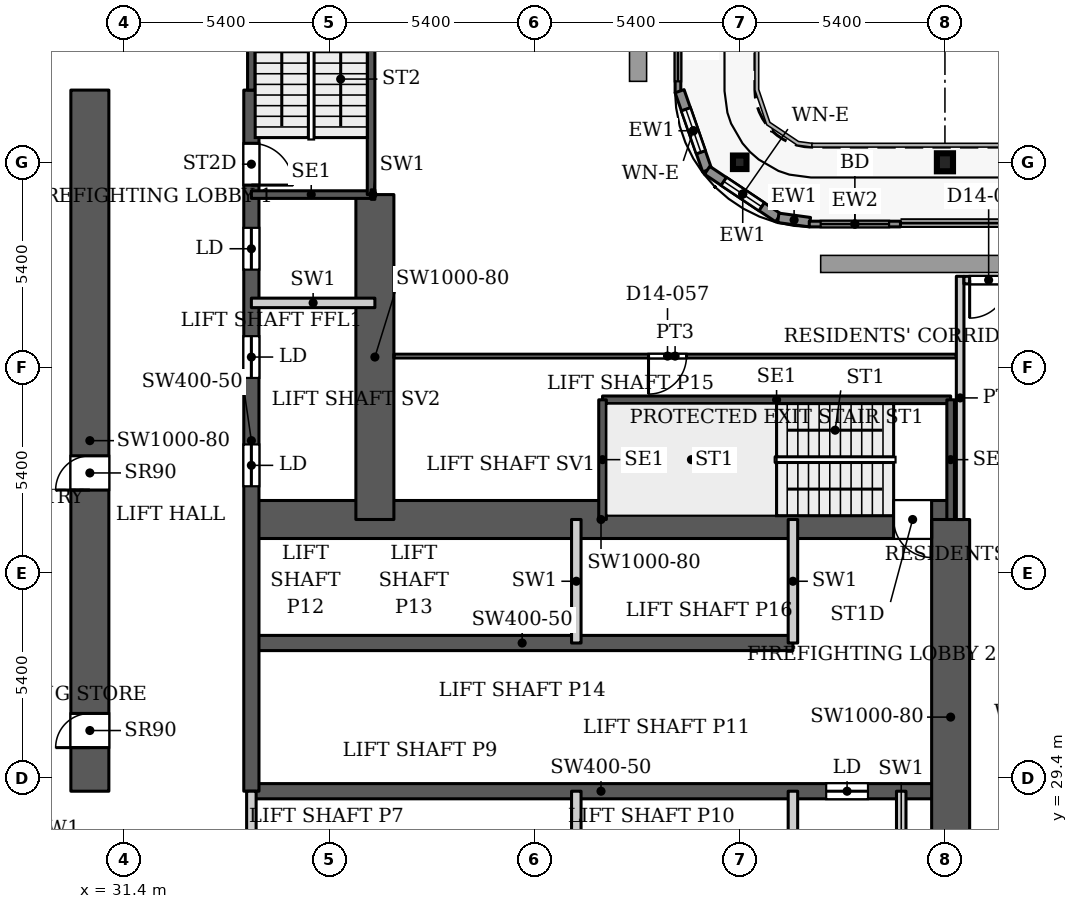
"""IFC4 building model, lengths in metres.
Left out: names, types, materials, properties, quantities, classifications, styles, units other than length and angle.
Written with IfcOpenShell. Run it as: python <this file> out.ifc"""

import sys

from ifc_helpers import new_model, si_unit, direction, frame, frame_2d, origin, origin_2d, place, context, subcontext, project, spatial, rectangle, hollow_rectangle, i_section, extrude, source, transform, mapped, element, fill, save


model = new_model("IFC4")
c1 = context("Model", 3, precision=1e-05, world=origin(), true_north=direction((0.0, 1.0)))
c2 = subcontext(c1, "Body", "Model", "MODEL_VIEW")
j1 = project(units=[si_unit("LENGTHUNIT", "METRE"), si_unit("PLANEANGLEUNIT", "RADIAN")], contexts=[c1])
p1 = place(None, origin())
s1 = spatial("IfcSite", under=j1, at=p1, CompositionType="ELEMENT")
p2 = place(p1, origin())
s2 = spatial("IfcBuilding", under=s1, at=p2, CompositionType="ELEMENT")
p3 = place(p2, frame((0.0, 0.0, 69.5)))
s3 = spatial("IfcBuildingStorey", under=s2, at=p3, CompositionType="ELEMENT", Elevation=69.5)
p4 = place(p3, frame((53.0, 45.6, 0.0), z_axis=(0.0, 0.0, 1.0), x_axis=(1.0, 0.0, 0.0)))
e1 = element("IfcColumn", 1, at=p4, inside=s3, PredefinedType="COLUMN", context=c2, shape_type="SweptSolid", body=[
    extrude(i_section(OverallWidth=0.424, OverallDepth=0.474, WebThickness=0.048, FlangeThickness=0.077, FilletRadius=0.014, at=origin_2d()), origin(), (0.0, 0.0, 1.0), 3.9),
])
p5 = place(p3, frame((47.6, 45.6, 0.0), z_axis=(0.0, 0.0, 1.0), x_axis=(1.0, 0.0, 0.0)))
e2 = element("IfcColumn", 2, at=p5, inside=s3, PredefinedType="COLUMN", context=c2, shape_type="SweptSolid", body=[
    extrude(hollow_rectangle(XDim=0.356, YDim=0.356, WallThickness=0.016, InnerFilletRadius=0.016, OuterFilletRadius=0.032, at=origin_2d()), origin(), (0.0, 0.0, 1.0), 3.9),
])
p6 = place(p3, frame((34.75, 29.05, 0.0), z_axis=(0.0, 0.0, 1.0), x_axis=(1.0, 0.0, 0.0)))
e3 = element("IfcWall", 3, at=p6, inside=s3, PredefinedType="SHEAR", context=c2, shape_type="SweptSolid", body=[
    extrude(rectangle(XDim=18.4, YDim=0.4, at=frame_2d((9.2, 0.0))), origin(), (0.0, 0.0, 1.0), 3.9),
])
p7 = place(p6, frame((15.125, 0.0, 0.0)))
e4 = element("IfcOpeningElement", 4, at=p7, cuts=e3, PredefinedType="OPENING", context=c2, shape_type="SweptSolid", body=[
    extrude(rectangle(XDim=1.1, YDim=2.2, at=frame_2d((0.55, 1.1))), frame((0.0, 0.21, 0.0), z_axis=(0.0, -1.0, 0.0), x_axis=(1.0, 0.0, 0.0)), (0.0, 0.0, 1.0), 0.42),
])
p8 = place(p3, frame((34.75, 32.95, 0.0), z_axis=(0.0, 0.0, 1.0), x_axis=(1.0, 0.0, 0.0)))
e5 = element("IfcWall", 5, at=p8, inside=s3, PredefinedType="SHEAR", context=c2, shape_type="SweptSolid", body=[
    extrude(rectangle(XDim=14.25, YDim=0.4, at=frame_2d((7.125, 0.0))), origin(), (0.0, 0.0, 1.0), 3.9),
])
p9 = place(p3, frame((34.75, 36.2, 0.0), z_axis=(0.0, 0.0, 1.0), x_axis=(1.0, 0.0, 0.0)))
e6 = element("IfcWall", 6, at=p9, inside=s3, PredefinedType="SHEAR", context=c2, shape_type="SweptSolid", body=[
    extrude(rectangle(XDim=18.4, YDim=1.0, at=frame_2d((9.2, 0.0))), origin(), (0.0, 0.0, 1.0), 3.9),
])
p10 = place(p9, frame((16.9, 0.0, 0.0)))
e7 = element("IfcOpeningElement", 7, at=p10, cuts=e6, PredefinedType="OPENING", context=c2, shape_type="SweptSolid", body=[
    extrude(rectangle(XDim=1.0, YDim=2.2, at=frame_2d((0.5, 1.1))), frame((0.0, 0.51, 0.0), z_axis=(0.0, -1.0, 0.0), x_axis=(1.0, 0.0, 0.0)), (0.0, 0.0, 1.0), 1.02),
])
p11 = place(p3, frame((34.75, 29.05, 0.0), z_axis=(0.0, 0.0, 1.0), x_axis=(0.0, 1.0, 0.0)))
e8 = element("IfcWall", 8, at=p11, inside=s3, PredefinedType="SHEAR", context=c2, shape_type="SweptSolid", body=[
    extrude(rectangle(XDim=18.45, YDim=0.4, at=frame_2d((9.225, 0.0))), origin(), (0.0, 0.0, 1.0), 3.9),
])
p12 = place(p11, frame((8.025, 0.0, 0.0)))
e9 = element("IfcOpeningElement", 9, at=p12, cuts=e8, PredefinedType="OPENING", context=c2, shape_type="SweptSolid", body=[
    extrude(rectangle(XDim=1.1, YDim=2.2, at=frame_2d((0.55, 1.1))), frame((0.0, 0.21, 0.0), z_axis=(0.0, -1.0, 0.0), x_axis=(1.0, 0.0, 0.0)), (0.0, 0.0, 1.0), 0.42),
])
p13 = place(p11, frame((10.875, 0.0, 0.0)))
e10 = element("IfcOpeningElement", 10, at=p13, cuts=e8, PredefinedType="OPENING", context=c2, shape_type="SweptSolid", body=[
    extrude(rectangle(XDim=1.1, YDim=2.2, at=frame_2d((0.55, 1.1))), frame((0.0, 0.21, 0.0), z_axis=(0.0, -1.0, 0.0), x_axis=(1.0, 0.0, 0.0)), (0.0, 0.0, 1.0), 0.42),
])
p14 = place(p11, frame((13.725, 0.0, 0.0)))
e11 = element("IfcOpeningElement", 11, at=p14, cuts=e8, PredefinedType="OPENING", context=c2, shape_type="SweptSolid", body=[
    extrude(rectangle(XDim=1.1, YDim=2.2, at=frame_2d((0.55, 1.1))), frame((0.0, 0.21, 0.0), z_axis=(0.0, -1.0, 0.0), x_axis=(1.0, 0.0, 0.0)), (0.0, 0.0, 1.0), 0.42),
])
p15 = place(p11, frame((15.95, 0.0, 0.0)))
e12 = element("IfcOpeningElement", 12, at=p15, cuts=e8, PredefinedType="OPENING", context=c2, shape_type="SweptSolid", body=[
    extrude(rectangle(XDim=1.1, YDim=2.2, at=frame_2d((0.55, 1.1))), frame((0.0, 0.21, 0.0), z_axis=(0.0, -1.0, 0.0), x_axis=(1.0, 0.0, 0.0)), (0.0, 0.0, 1.0), 0.42),
])
p16 = place(p3, frame((38.0, 36.2, 0.0), z_axis=(0.0, 0.0, 1.0), x_axis=(0.0, 1.0, 0.0)))
e13 = element("IfcWall", 13, at=p16, inside=s3, PredefinedType="SHEAR", context=c2, shape_type="SweptSolid", body=[
    extrude(rectangle(XDim=8.55, YDim=1.0, at=frame_2d((4.275, 0.0))), origin(), (0.0, 0.0, 1.0), 3.9),
])
p17 = place(p3, frame((30.5, 29.05, 0.0), z_axis=(0.0, 0.0, 1.0), x_axis=(0.0, 1.0, 0.0)))
e14 = element("IfcWall", 14, at=p17, inside=s3, PredefinedType="SHEAR", context=c2, shape_type="SweptSolid", body=[
    extrude(rectangle(XDim=18.45, YDim=1.0, at=frame_2d((9.225, 0.0))), origin(), (0.0, 0.0, 1.0), 3.9),
])
p18 = place(p17, frame((1.147, 0.0, 0.0)))
e15 = element("IfcOpeningElement", 15, at=p18, cuts=e14, PredefinedType="OPENING", context=c2, shape_type="SweptSolid", body=[
    extrude(rectangle(XDim=0.9, YDim=2.2, at=frame_2d((0.45, 1.1))), frame((0.0, 0.51, 0.0), z_axis=(0.0, -1.0, 0.0), x_axis=(1.0, 0.0, 0.0)), (0.0, 0.0, 1.0), 1.02),
])
p19 = place(p17, frame((7.925, 0.0, 0.0)))
e16 = element("IfcOpeningElement", 16, at=p19, cuts=e14, PredefinedType="OPENING", context=c2, shape_type="SweptSolid", body=[
    extrude(rectangle(XDim=0.9, YDim=2.2, at=frame_2d((0.45, 1.1))), frame((0.0, 0.51, 0.0), z_axis=(0.0, -1.0, 0.0), x_axis=(1.0, 0.0, 0.0)), (0.0, 0.0, 1.0), 1.02),
])
p20 = place(p3, frame((53.15, 25.8, 0.0), z_axis=(0.0, 0.0, 1.0), x_axis=(0.0, 1.0, 0.0)))
e17 = element("IfcWall", 17, at=p20, inside=s3, PredefinedType="SHEAR", context=c2, shape_type="SweptSolid", body=[
    extrude(rectangle(XDim=10.4, YDim=1.0, at=frame_2d((5.2, 0.0))), origin(), (0.0, 0.0, 1.0), 3.9),
])
p21 = place(p20, frame((1.175, 0.0, 0.0)))
e18 = element("IfcOpeningElement", 18, at=p21, cuts=e17, PredefinedType="OPENING", context=c2, shape_type="SweptSolid", body=[
    extrude(rectangle(XDim=0.9, YDim=2.2, at=frame_2d((0.45, 1.1))), frame((0.0, 0.51, 0.0), z_axis=(0.0, -1.0, 0.0), x_axis=(1.0, 0.0, 0.0)), (0.0, 0.0, 1.0), 1.02),
])
p22 = place(p3, frame((29.712, 26.072, 0.0), z_axis=(0.0, 0.0, 1.0), x_axis=(-0.511028049012, 0.859564036662, 0.0)))
e19 = element("IfcWall", 19, at=p22, inside=s3, PredefinedType="SOLIDWALL", context=c2, shape_type="SweptSolid", body=[
    extrude(rectangle(XDim=4.634, YDim=0.25, at=frame_2d((2.317, 0.0))), origin(), (0.0, 0.0, 1.0), 3.133),
])
p23 = place(p3, frame((27.195, 31.969, 0.0), z_axis=(0.0, 0.0, 1.0), x_axis=(0.052554995867, 0.998618031286, 0.0)))
e20 = element("IfcWall", 20, at=p23, inside=s3, PredefinedType="SOLIDWALL", context=c2, shape_type="SweptSolid", body=[
    extrude(rectangle(XDim=66.787, YDim=0.25, at=frame_2d((33.394, 0.0))), origin(), (0.0, 0.0, 1.0), 3.75),
])
p24 = place(p3, frame((45.975, 49.83, 0.0), z_axis=(0.0, 0.0, 1.0), x_axis=(0.0, -1.0, 0.0)))
e21 = element("IfcWall", 21, at=p24, inside=s3, PredefinedType="SOLIDWALL", context=c2, shape_type="SweptSolid", body=[
    extrude(rectangle(XDim=2.4, YDim=0.15, at=frame_2d((1.2, 0.0))), origin(), (0.0, 0.0, 1.0), 3.75),
])
p25 = place(p24, frame((0.3, 0.0, 0.0)))
e22 = element("IfcOpeningElement", 22, at=p25, cuts=e21, PredefinedType="OPENING", context=c2, shape_type="SweptSolid", body=[
    extrude(rectangle(XDim=1.8, YDim=2.4, at=frame_2d((0.9, 1.2))), frame((0.0, 0.085, 0.0), z_axis=(0.0, -1.0, 0.0), x_axis=(1.0, 0.0, 0.0)), (0.0, 0.0, 1.0), 0.17),
])
p26 = place(p3, frame((46.018, 47.471, 0.0), z_axis=(0.0, 0.0, 1.0), x_axis=(0.328791208903, -0.944402637093, 0.0)))
e23 = element("IfcWall", 23, at=p26, inside=s3, PredefinedType="SOLIDWALL", context=c2, shape_type="SweptSolid", body=[
    extrude(rectangle(XDim=2.205, YDim=0.25, at=frame_2d((1.102, 0.0))), origin(), (0.0, 0.0, 1.0), 3.75),
])
p27 = place(p26, frame((0.503, 0.0, 0.6)))
e24 = element("IfcOpeningElement", 24, at=p27, cuts=e23, PredefinedType="OPENING", context=c2, shape_type="SweptSolid", body=[
    extrude(rectangle(XDim=1.2, YDim=2.1, at=frame_2d((0.6, 1.05))), frame((0.0, 0.135, 0.0), z_axis=(0.0, -1.0, 0.0), x_axis=(1.0, 0.0, 0.0)), (0.0, 0.0, 1.0), 0.27),
])
p28 = place(p3, frame((46.743, 45.389, 0.0), z_axis=(0.0, 0.0, 1.0), x_axis=(0.831449265529, -0.555600682912, 0.0)))
e25 = element("IfcWall", 25, at=p28, inside=s3, PredefinedType="SOLIDWALL", context=c2, shape_type="SweptSolid", body=[
    extrude(rectangle(XDim=2.251, YDim=0.25, at=frame_2d((1.126, 0.0))), origin(), (0.0, 0.0, 1.0), 3.75),
])
p29 = place(p28, frame((0.525, 0.0, 0.6)))
e26 = element("IfcOpeningElement", 26, at=p29, cuts=e25, PredefinedType="OPENING", context=c2, shape_type="SweptSolid", body=[
    extrude(rectangle(XDim=1.2, YDim=2.1, at=frame_2d((0.6, 1.05))), frame((0.0, 0.135, 0.0), z_axis=(0.0, -1.0, 0.0), x_axis=(1.0, 0.0, 0.0)), (0.0, 0.0, 1.0), 0.27),
])
p30 = place(p3, frame((48.615, 44.138, 0.0), z_axis=(0.0, 0.0, 1.0), x_axis=(0.990741504246, -0.135761819977, 0.0)))
e27 = element("IfcWall", 27, at=p30, inside=s3, PredefinedType="SOLIDWALL", context=c2, shape_type="SweptSolid", body=[
    extrude(rectangle(XDim=0.84, YDim=0.25, at=frame_2d((0.42, 0.0))), origin(), (0.0, 0.0, 1.0), 3.75),
])
p31 = place(p3, frame((49.43, 43.975, 0.0), z_axis=(0.0, 0.0, 1.0), x_axis=(1.0, 0.0, 0.0)))
e28 = element("IfcWall", 28, at=p31, inside=s3, PredefinedType="SOLIDWALL", context=c2, shape_type="SweptSolid", body=[
    extrude(rectangle(XDim=2.4, YDim=0.15, at=frame_2d((1.2, 0.0))), origin(), (0.0, 0.0, 1.0), 3.75),
])
p32 = place(p31, frame((0.3, 0.0, 0.0)))
e29 = element("IfcOpeningElement", 29, at=p32, cuts=e28, PredefinedType="OPENING", context=c2, shape_type="SweptSolid", body=[
    extrude(rectangle(XDim=1.8, YDim=2.4, at=frame_2d((0.9, 1.2))), frame((0.0, 0.085, 0.0), z_axis=(0.0, -1.0, 0.0), x_axis=(1.0, 0.0, 0.0)), (0.0, 0.0, 1.0), 0.17),
])
p33 = place(p3, frame((43.99, 39.35, 0.0), z_axis=(0.0, 0.0, 1.0), x_axis=(1.0, 0.0, 0.0)))
e30 = element("IfcWall", 30, at=p33, inside=s3, PredefinedType="SHEAR", context=c2, shape_type="SweptSolid", body=[
    extrude(rectangle(XDim=9.16, YDim=0.2, at=frame_2d((4.58, 0.0))), origin(), (0.0, 0.0, 1.0), 3.9),
])
for number, where, z_axis, x_axis in (
    (31, (43.99, 36.2, 0.0), (0.0, 0.0, 1.0), (0.0, 1.0, 0.0)),
    (32, (53.15, 36.2, 0.0), (0.0, 0.0, 1.0), (0.0, 1.0, 0.0)),
):
    element("IfcWall", number, at=place(p3, frame(where, z_axis=z_axis, x_axis=x_axis)), inside=s3, PredefinedType="SHEAR", context=c2, shape_type="SweptSolid", body=[
        extrude(rectangle(XDim=3.15, YDim=0.2, at=frame_2d((1.575, 0.0))), origin(), (0.0, 0.0, 1.0), 3.9),
    ])
p34 = place(p3, frame((34.75, 44.75, 0.0), z_axis=(0.0, 0.0, 1.0), x_axis=(1.0, 0.0, 0.0)))
e33 = element("IfcWall", 33, at=p34, inside=s3, PredefinedType="SHEAR", context=c2, shape_type="SweptSolid", body=[
    extrude(rectangle(XDim=3.15, YDim=0.2, at=frame_2d((1.575, 0.0))), origin(), (0.0, 0.0, 1.0), 3.9),
])
p35 = place(p3, frame((34.75, 47.5, 0.0), z_axis=(0.0, 0.0, 1.0), x_axis=(0.0, 1.0, 0.0)))
e34 = element("IfcWall", 34, at=p35, inside=s3, PredefinedType="SHEAR", context=c2, shape_type="SweptSolid", body=[
    extrude(rectangle(XDim=6.41, YDim=0.2, at=frame_2d((3.205, 0.0))), origin(), (0.0, 0.0, 1.0), 3.9),
])
p36 = place(p3, frame((37.9, 44.75, 0.0), z_axis=(0.0, 0.0, 1.0), x_axis=(0.0, 1.0, 0.0)))
e35 = element("IfcWall", 35, at=p36, inside=s3, PredefinedType="SHEAR", context=c2, shape_type="SweptSolid", body=[
    extrude(rectangle(XDim=9.16, YDim=0.2, at=frame_2d((4.58, 0.0))), origin(), (0.0, 0.0, 1.0), 3.9),
])
for number, where, z_axis, x_axis in (
    (36, (34.75, 25.8, 0.0), (0.0, 0.0, 1.0), (0.0, 1.0, 0.0)),
    (37, (43.3, 25.8, 0.0), (0.0, 0.0, 1.0), (0.0, 1.0, 0.0)),
    (38, (43.3, 32.95, 0.0), (0.0, 0.0, 1.0), (0.0, 1.0, 0.0)),
    (39, (49.0, 25.8, 0.0), (0.0, 0.0, 1.0), (0.0, 1.0, 0.0)),
    (40, (49.0, 32.95, 0.0), (0.0, 0.0, 1.0), (0.0, 1.0, 0.0)),
    (41, (51.85, 25.8, 0.0), (0.0, 0.0, 1.0), (0.0, 1.0, 0.0)),
    (42, (34.75, 41.9, 0.0), (0.0, 0.0, 1.0), (1.0, 0.0, 0.0)),
):
    element("IfcWall", number, at=place(p3, frame(where, z_axis=z_axis, x_axis=x_axis)), inside=s3, PredefinedType="PARTITIONING", context=c2, shape_type="SweptSolid", body=[
        extrude(rectangle(XDim=3.25, YDim=0.25, at=frame_2d((1.625, 0.0))), origin(), (0.0, 0.0, 1.0), 3.9),
    ])
p37 = place(p3, frame((37.9, 44.75, 0.0), z_axis=(0.0, 0.0, 1.0), x_axis=(1.0, 0.0, 0.0)))
e43 = element("IfcWall", 43, at=p37, inside=s3, PredefinedType="PARTITIONING", context=c2, shape_type="SweptSolid", body=[
    extrude(rectangle(XDim=0.1, YDim=0.25, at=frame_2d((0.05, 0.0))), origin(), (0.0, 0.0, 1.0), 3.9),
])
p38 = place(p3, frame((38.499, 40.5, 0.0), z_axis=(0.0, 0.0, 1.0), x_axis=(1.0, 0.0, 0.0)))
e44 = element("IfcWall", 44, at=p38, inside=s3, PredefinedType="PARTITIONING", context=c2, shape_type="SweptSolid", body=[
    extrude(rectangle(XDim=14.801, YDim=0.1, at=frame_2d((7.4, 0.0))), origin(), (0.0, 0.0, 1.0), 3.6),
])
p39 = place(p38, frame((6.701, 0.0, 0.0)))
e45 = element("IfcOpeningElement", 45, at=p39, cuts=e44, PredefinedType="OPENING", context=c2, shape_type="SweptSolid", body=[
    extrude(rectangle(XDim=1.0, YDim=2.1, at=frame_2d((0.5, 1.05))), frame((0.0, 0.06, 0.0), z_axis=(0.0, -1.0, 0.0), x_axis=(1.0, 0.0, 0.0)), (0.0, 0.0, 1.0), 0.12),
])
p40 = place(p3, frame((53.4, 36.199, 0.0), z_axis=(0.0, 0.0, 1.0), x_axis=(0.0, 1.0, 0.0)))
e46 = element("IfcWall", 46, at=p40, inside=s3, PredefinedType="PARTITIONING", context=c2, shape_type="SweptSolid", body=[
    extrude(rectangle(XDim=6.401, YDim=0.2, at=frame_2d((3.201, 0.0))), origin(), (0.0, 0.0, 1.0), 3.6),
])
p41 = place(p3, frame((53.5, 42.5, 0.0), z_axis=(0.0, 0.0, 1.0), x_axis=(1.0, 0.0, 0.0)))
e47 = element("IfcWall", 47, at=p41, inside=s3, PredefinedType="PARTITIONING", context=c2, shape_type="SweptSolid", body=[
    extrude(rectangle(XDim=2.2, YDim=0.2, at=frame_2d((1.1, 0.0))), origin(), (0.0, 0.0, 1.0), 3.6),
])
p42 = place(p41, frame((0.15, 0.0, 0.0)))
e48 = element("IfcOpeningElement", 48, at=p42, cuts=e47, PredefinedType="OPENING", context=c2, shape_type="SweptSolid", body=[
    extrude(rectangle(XDim=1.0, YDim=2.1, at=frame_2d((0.5, 1.05))), frame((0.0, 0.11, 0.0), z_axis=(0.0, -1.0, 0.0), x_axis=(1.0, 0.0, 0.0)), (0.0, 0.0, 1.0), 0.22),
])
m1 = source(origin(), c2, "Body", "SweptSolid", [
    extrude(rectangle(XDim=1.8, YDim=2.4, at=frame_2d((0.9, 1.2))), frame((0.0, 0.025, 0.0), z_axis=(0.0, -1.0, 0.0), x_axis=(1.0, 0.0, 0.0)), (0.0, 0.0, 1.0), 0.05),
])
p43 = place(p25, origin())
e49 = element("IfcDoor", 49, at=p43, inside=s3, OperationType="SLIDING_TO_LEFT", PredefinedType="DOOR", context=c2, shape_type="MappedRepresentation", body=[
    mapped(m1, transform((0.0, 0.0, 0.0), x_axis=(1.0, 0.0, 0.0), y_axis=(0.0, 1.0, 0.0), z_axis=(0.0, 0.0, 1.0), scale=1.0)),
])
fill(e22, e49)
m2 = source(origin(), c2, "Body", "SweptSolid", [
    extrude(rectangle(XDim=1.2, YDim=2.1, at=frame_2d((0.6, 1.05))), frame((0.0, 0.03, 0.0), z_axis=(0.0, -1.0, 0.0), x_axis=(1.0, 0.0, 0.0)), (0.0, 0.0, 1.0), 0.06),
])
p44 = place(p27, origin())
e50 = element("IfcWindow", 50, at=p44, inside=s3, PartitioningType="SINGLE_PANEL", PredefinedType="WINDOW", context=c2, shape_type="MappedRepresentation", body=[
    mapped(m2, transform((0.0, 0.0, 0.0), x_axis=(1.0, 0.0, 0.0), y_axis=(0.0, 1.0, 0.0), z_axis=(0.0, 0.0, 1.0), scale=1.0)),
])
fill(e24, e50)
p45 = place(p29, origin())
e51 = element("IfcWindow", 51, at=p45, inside=s3, PartitioningType="SINGLE_PANEL", PredefinedType="WINDOW", context=c2, shape_type="MappedRepresentation", body=[
    mapped(m2, transform((0.0, 0.0, 0.0), x_axis=(1.0, 0.0, 0.0), y_axis=(0.0, 1.0, 0.0), z_axis=(0.0, 0.0, 1.0), scale=1.0)),
])
fill(e26, e51)
p46 = place(p32, origin())
e52 = element("IfcDoor", 52, at=p46, inside=s3, OperationType="SLIDING_TO_LEFT", PredefinedType="DOOR", context=c2, shape_type="MappedRepresentation", body=[
    mapped(m1, transform((0.0, 0.0, 0.0), x_axis=(1.0, 0.0, 0.0), y_axis=(0.0, 1.0, 0.0), z_axis=(0.0, 0.0, 1.0), scale=1.0)),
])
fill(e29, e52)
m3 = source(origin(), c2, "Body", "SweptSolid", [
    extrude(rectangle(XDim=1.1, YDim=2.2, at=frame_2d((0.55, 1.1))), frame((0.0, 0.025, 0.0), z_axis=(0.0, -1.0, 0.0), x_axis=(1.0, 0.0, 0.0)), (0.0, 0.0, 1.0), 0.05),
])
p47 = place(p12, origin())
e53 = element("IfcDoor", 53, at=p47, inside=s3, OperationType="SLIDING_TO_LEFT", PredefinedType="DOOR", context=c2, shape_type="MappedRepresentation", body=[
    mapped(m3, transform((0.0, 0.0, 0.0), x_axis=(1.0, 0.0, 0.0), y_axis=(0.0, 1.0, 0.0), z_axis=(0.0, 0.0, 1.0), scale=1.0)),
])
fill(e9, e53)
p48 = place(p13, origin())
e54 = element("IfcDoor", 54, at=p48, inside=s3, OperationType="SLIDING_TO_LEFT", PredefinedType="DOOR", context=c2, shape_type="MappedRepresentation", body=[
    mapped(m3, transform((0.0, 0.0, 0.0), x_axis=(1.0, 0.0, 0.0), y_axis=(0.0, 1.0, 0.0), z_axis=(0.0, 0.0, 1.0), scale=1.0)),
])
fill(e10, e54)
p49 = place(p14, origin())
e55 = element("IfcDoor", 55, at=p49, inside=s3, OperationType="SLIDING_TO_LEFT", PredefinedType="DOOR", context=c2, shape_type="MappedRepresentation", body=[
    mapped(m3, transform((0.0, 0.0, 0.0), x_axis=(1.0, 0.0, 0.0), y_axis=(0.0, 1.0, 0.0), z_axis=(0.0, 0.0, 1.0), scale=1.0)),
])
fill(e11, e55)
p50 = place(p7, origin())
e56 = element("IfcDoor", 56, at=p50, inside=s3, OperationType="SLIDING_TO_LEFT", PredefinedType="DOOR", context=c2, shape_type="MappedRepresentation", body=[
    mapped(m3, transform((0.0, 0.0, 0.0), x_axis=(1.0, 0.0, 0.0), y_axis=(0.0, 1.0, 0.0), z_axis=(0.0, 0.0, 1.0), scale=1.0)),
])
fill(e4, e56)
m4 = source(origin(), c2, "Body", "SweptSolid", [
    extrude(rectangle(XDim=0.9, YDim=2.2, at=frame_2d((0.45, 1.1))), frame((0.0, 0.025, 0.0), z_axis=(0.0, -1.0, 0.0), x_axis=(1.0, 0.0, 0.0)), (0.0, 0.0, 1.0), 0.05),
])
p51 = place(p18, origin())
e57 = element("IfcDoor", 57, at=p51, inside=s3, OperationType="SINGLE_SWING_LEFT", PredefinedType="DOOR", context=c2, shape_type="MappedRepresentation", body=[
    mapped(m4, transform((0.0, 0.0, 0.0), x_axis=(1.0, 0.0, 0.0), y_axis=(0.0, 1.0, 0.0), z_axis=(0.0, 0.0, 1.0), scale=1.0)),
])
fill(e15, e57)
p52 = place(p19, origin())
e58 = element("IfcDoor", 58, at=p52, inside=s3, OperationType="SINGLE_SWING_LEFT", PredefinedType="DOOR", context=c2, shape_type="MappedRepresentation", body=[
    mapped(m4, transform((0.0, 0.0, 0.0), x_axis=(1.0, 0.0, 0.0), y_axis=(0.0, 1.0, 0.0), z_axis=(0.0, 0.0, 1.0), scale=1.0)),
])
fill(e16, e58)
m5 = source(origin(), c2, "Body", "SweptSolid", [
    extrude(rectangle(XDim=1.0, YDim=2.2, at=frame_2d((0.5, 1.1))), frame((0.0, 0.025, 0.0), z_axis=(0.0, -1.0, 0.0), x_axis=(1.0, 0.0, 0.0)), (0.0, 0.0, 1.0), 0.05),
])
p53 = place(p10, origin())
e59 = element("IfcDoor", 59, at=p53, inside=s3, OperationType="SINGLE_SWING_RIGHT", PredefinedType="DOOR", context=c2, shape_type="MappedRepresentation", body=[
    mapped(m5, transform((0.0, 0.0, 0.0), x_axis=(1.0, 0.0, 0.0), y_axis=(0.0, 1.0, 0.0), z_axis=(0.0, 0.0, 1.0), scale=1.0)),
])
fill(e7, e59)
m6 = source(origin(), c2, "Body", "SweptSolid", [
    extrude(rectangle(XDim=1.1, YDim=2.2, at=frame_2d((0.55, 1.1))), frame((0.0, 0.025, 0.0), z_axis=(0.0, -1.0, 0.0), x_axis=(1.0, 0.0, 0.0)), (0.0, 0.0, 1.0), 0.05),
])
p54 = place(p15, origin())
e60 = element("IfcDoor", 60, at=p54, inside=s3, OperationType="SINGLE_SWING_RIGHT", PredefinedType="DOOR", context=c2, shape_type="MappedRepresentation", body=[
    mapped(m6, transform((0.0, 0.0, 0.0), x_axis=(1.0, 0.0, 0.0), y_axis=(0.0, 1.0, 0.0), z_axis=(0.0, 0.0, 1.0), scale=1.0)),
])
fill(e12, e60)
m7 = source(origin(), c2, "Body", "SweptSolid", [
    extrude(rectangle(XDim=1.0, YDim=2.1, at=frame_2d((0.5, 1.05))), frame((0.0, 0.025, 0.0), z_axis=(0.0, -1.0, 0.0), x_axis=(1.0, 0.0, 0.0)), (0.0, 0.0, 1.0), 0.05),
])
p55 = place(p39, origin())
e61 = element("IfcDoor", 61, at=p55, inside=s3, OperationType="SINGLE_SWING_RIGHT", PredefinedType="DOOR", context=c2, shape_type="MappedRepresentation", body=[
    mapped(m7, transform((0.0, 0.0, 0.0), x_axis=(1.0, 0.0, 0.0), y_axis=(0.0, 1.0, 0.0), z_axis=(0.0, 0.0, 1.0), scale=1.0)),
])
fill(e45, e61)
m8 = source(origin(), c2, "Body", "SweptSolid", [
    extrude(rectangle(XDim=1.0, YDim=2.1, at=frame_2d((0.5, 1.05))), frame((0.0, 0.025, 0.0), z_axis=(0.0, -1.0, 0.0), x_axis=(1.0, 0.0, 0.0)), (0.0, 0.0, 1.0), 0.05),
])
p56 = place(p42, origin())
e62 = element("IfcDoor", 62, at=p56, inside=s3, OperationType="SINGLE_SWING_RIGHT", PredefinedType="DOOR", context=c2, shape_type="MappedRepresentation", body=[
    mapped(m8, transform((0.0, 0.0, 0.0), x_axis=(1.0, 0.0, 0.0), y_axis=(0.0, 1.0, 0.0), z_axis=(0.0, 0.0, 1.0), scale=1.0)),
])
fill(e48, e62)
save(model, sys.argv[1])
